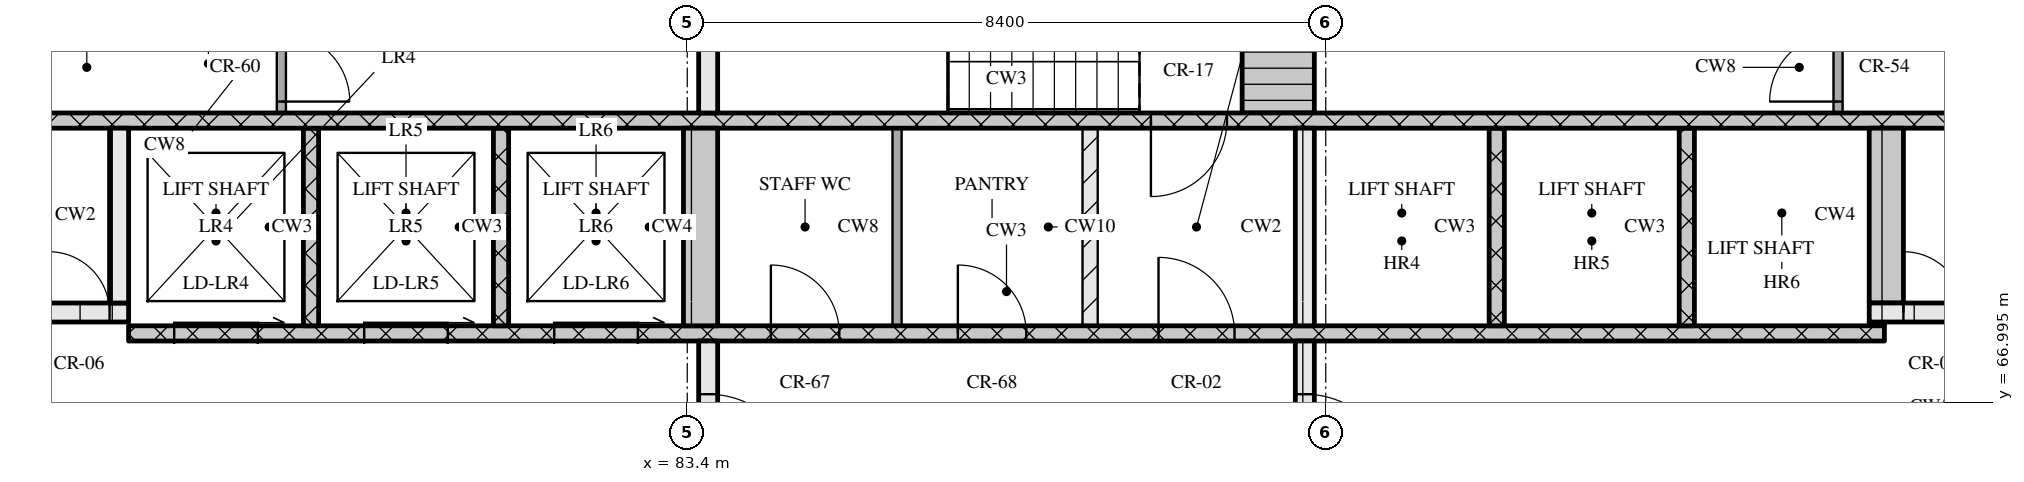
"""IFC4 building model, lengths in metres.
Left out: names, types, materials, properties, quantities, classifications, styles, units other than length and angle.
Written with IfcOpenShell. Run it as: python <this file> out.ifc"""

import sys

from ifc_helpers import new_model, si_unit, direction, frame, frame_2d, origin, place, context, subcontext, project, spatial, rectangle, extrude, element, fill, save


model = new_model("IFC4")
c1 = context("Model", 3, precision=1e-05, world=origin(), true_north=direction((0.0, 1.0)))
c2 = subcontext(c1, "Body", "Model", "MODEL_VIEW")
j1 = project(units=[si_unit("LENGTHUNIT", "METRE"), si_unit("PLANEANGLEUNIT", "RADIAN")], contexts=[c1])
p1 = place(None, origin())
s1 = spatial("IfcSite", under=j1, at=p1, CompositionType="ELEMENT")
p2 = place(p1, origin())
s2 = spatial("IfcBuilding", under=s1, at=p2, CompositionType="ELEMENT")
p3 = place(p2, frame((0.0, 0.0, 76.8)))
s3 = spatial("IfcBuildingStorey", under=s2, at=p3, CompositionType="ELEMENT", Elevation=76.8)
p4 = place(p3, frame((83.675, 65.2, 0.0), z_axis=(0.0, 0.0, 1.0), x_axis=(0.0, 1.0, 0.0)))
e1 = element("IfcWall", 1, at=p4, inside=s3, PredefinedType="SOLIDWALL", context=c2, shape_type="SweptSolid", body=[
    extrude(rectangle(XDim=2.6, YDim=0.25, at=frame_2d((1.3, 0.0))), origin(), (0.0, 0.0, 1.0), 3.32),
])
p5 = place(p4, frame((0.7, 0.0, 0.0)))
e2 = element("IfcOpeningElement", 2, at=p5, cuts=e1, PredefinedType="OPENING", context=c2, shape_type="SweptSolid", body=[
    extrude(rectangle(XDim=1.2, YDim=2.1, at=frame_2d((0.6, 1.05))), frame((0.0, 0.135, 0.0), z_axis=(0.0, -1.0, 0.0), x_axis=(1.0, 0.0, 0.0)), (0.0, 0.0, 1.0), 0.27),
])
p6 = place(p3, frame((91.525, 65.2, 0.0), z_axis=(0.0, 0.0, 1.0), x_axis=(0.0, 1.0, 0.0)))
e3 = element("IfcWall", 3, at=p6, inside=s3, PredefinedType="SOLIDWALL", context=c2, shape_type="SweptSolid", body=[
    extrude(rectangle(XDim=2.6, YDim=0.25, at=frame_2d((1.3, 0.0))), origin(), (0.0, 0.0, 1.0), 3.32),
])
p7 = place(p6, frame((0.7, 0.0, 0.0)))
e4 = element("IfcOpeningElement", 4, at=p7, cuts=e3, PredefinedType="OPENING", context=c2, shape_type="SweptSolid", body=[
    extrude(rectangle(XDim=1.2, YDim=2.1, at=frame_2d((0.6, 1.05))), frame((0.0, 0.135, 0.0), z_axis=(0.0, -1.0, 0.0), x_axis=(1.0, 0.0, 0.0)), (0.0, 0.0, 1.0), 0.27),
])
p8 = place(p3, frame((76.05, 67.9, 0.0), z_axis=(0.0, 0.0, 1.0), x_axis=(1.0, 0.0, 0.0)))
e5 = element("IfcWall", 5, at=p8, inside=s3, PredefinedType="SOLIDWALL", context=c2, shape_type="SweptSolid", body=[
    extrude(rectangle(XDim=23.1, YDim=0.2, at=frame_2d((11.55, 0.0))), origin(), (0.0, 0.0, 1.0), 3.32),
])
p9 = place(p8, frame((0.6, 0.0, 0.0)))
e6 = element("IfcOpeningElement", 6, at=p9, cuts=e5, PredefinedType="OPENING", context=c2, shape_type="SweptSolid", body=[
    extrude(rectangle(XDim=1.1, YDim=2.1, at=frame_2d((0.55, 1.05))), frame((0.0, 0.11, 0.0), z_axis=(0.0, -1.0, 0.0), x_axis=(1.0, 0.0, 0.0)), (0.0, 0.0, 1.0), 0.22),
])
p10 = place(p8, frame((3.1, 0.0, 0.0)))
e7 = element("IfcOpeningElement", 7, at=p10, cuts=e5, PredefinedType="OPENING", context=c2, shape_type="SweptSolid", body=[
    extrude(rectangle(XDim=1.1, YDim=2.1, at=frame_2d((0.55, 1.05))), frame((0.0, 0.11, 0.0), z_axis=(0.0, -1.0, 0.0), x_axis=(1.0, 0.0, 0.0)), (0.0, 0.0, 1.0), 0.22),
])
p11 = place(p8, frame((5.6, 0.0, 0.0)))
e8 = element("IfcOpeningElement", 8, at=p11, cuts=e5, PredefinedType="OPENING", context=c2, shape_type="SweptSolid", body=[
    extrude(rectangle(XDim=1.1, YDim=2.1, at=frame_2d((0.55, 1.05))), frame((0.0, 0.11, 0.0), z_axis=(0.0, -1.0, 0.0), x_axis=(1.0, 0.0, 0.0)), (0.0, 0.0, 1.0), 0.22),
])
p12 = place(p8, frame((8.45, 0.0, 0.0)))
e9 = element("IfcOpeningElement", 9, at=p12, cuts=e5, PredefinedType="OPENING", context=c2, shape_type="SweptSolid", body=[
    extrude(rectangle(XDim=0.9, YDim=2.1, at=frame_2d((0.45, 1.05))), frame((0.0, 0.11, 0.0), z_axis=(0.0, -1.0, 0.0), x_axis=(1.0, 0.0, 0.0)), (0.0, 0.0, 1.0), 0.22),
])
p13 = place(p8, frame((10.91, 0.0, 0.0)))
e10 = element("IfcOpeningElement", 10, at=p13, cuts=e5, PredefinedType="OPENING", context=c2, shape_type="SweptSolid", body=[
    extrude(rectangle(XDim=0.9, YDim=2.1, at=frame_2d((0.45, 1.05))), frame((0.0, 0.11, 0.0), z_axis=(0.0, -1.0, 0.0), x_axis=(1.0, 0.0, 0.0)), (0.0, 0.0, 1.0), 0.22),
])
p14 = place(p8, frame((13.55, 0.0, 0.0)))
e11 = element("IfcOpeningElement", 11, at=p14, cuts=e5, PredefinedType="OPENING", context=c2, shape_type="SweptSolid", body=[
    extrude(rectangle(XDim=1.0, YDim=2.1, at=frame_2d((0.5, 1.05))), frame((0.0, 0.11, 0.0), z_axis=(0.0, -1.0, 0.0), x_axis=(1.0, 0.0, 0.0)), (0.0, 0.0, 1.0), 0.22),
])
for number, where, z_axis, x_axis in (
    (12, (78.45, 68.0, 0.0), (0.0, 0.0, 1.0), (0.0, 1.0, 0.0)),
    (13, (80.95, 68.0, 0.0), (0.0, 0.0, 1.0), (0.0, 1.0, 0.0)),
):
    element("IfcWall", number, at=place(p3, frame(where, z_axis=z_axis, x_axis=x_axis)), inside=s3, PredefinedType="SOLIDWALL", context=c2, shape_type="SweptSolid", body=[
        extrude(rectangle(XDim=2.6, YDim=0.2, at=frame_2d((1.3, 0.0))), origin(), (0.0, 0.0, 1.0), 3.32),
    ])
p15 = place(p3, frame((83.575, 68.0, 0.0), z_axis=(0.0, 0.0, 1.0), x_axis=(0.0, 1.0, 0.0)))
e14 = element("IfcWall", 14, at=p15, inside=s3, PredefinedType="SOLIDWALL", context=c2, shape_type="SweptSolid", body=[
    extrude(rectangle(XDim=2.6, YDim=0.45, at=frame_2d((1.3, 0.0))), origin(), (0.0, 0.0, 1.0), 3.32),
])
p16 = place(p3, frame((86.16, 68.0, 0.0), z_axis=(0.0, 0.0, 1.0), x_axis=(0.0, 1.0, 0.0)))
e15 = element("IfcWall", 15, at=p16, inside=s3, PredefinedType="PARTITIONING", context=c2, shape_type="SweptSolid", body=[
    extrude(rectangle(XDim=2.6, YDim=0.12, at=frame_2d((1.3, 0.0))), origin(), (0.0, 0.0, 1.0), 3.32),
])
p17 = place(p3, frame((88.7, 68.0, 0.0), z_axis=(0.0, 0.0, 1.0), x_axis=(0.0, 1.0, 0.0)))
e16 = element("IfcWall", 16, at=p17, inside=s3, PredefinedType="PARTITIONING", context=c2, shape_type="SweptSolid", body=[
    extrude(rectangle(XDim=2.6, YDim=0.2, at=frame_2d((1.3, 0.0))), origin(), (0.0, 0.0, 1.0), 3.32),
])
p18 = place(p3, frame((91.525, 68.0, 0.0), z_axis=(0.0, 0.0, 1.0), x_axis=(0.0, 1.0, 0.0)))
e17 = element("IfcWall", 17, at=p18, inside=s3, PredefinedType="SOLIDWALL", context=c2, shape_type="SweptSolid", body=[
    extrude(rectangle(XDim=2.6, YDim=0.25, at=frame_2d((1.3, 0.0))), origin(), (0.0, 0.0, 1.0), 3.32),
])
for number, where, z_axis, x_axis in (
    (18, (94.05, 68.0, 0.0), (0.0, 0.0, 1.0), (0.0, 1.0, 0.0)),
    (19, (96.55, 68.0, 0.0), (0.0, 0.0, 1.0), (0.0, 1.0, 0.0)),
):
    element("IfcWall", number, at=place(p3, frame(where, z_axis=z_axis, x_axis=x_axis)), inside=s3, PredefinedType="SOLIDWALL", context=c2, shape_type="SweptSolid", body=[
        extrude(rectangle(XDim=2.6, YDim=0.2, at=frame_2d((1.3, 0.0))), origin(), (0.0, 0.0, 1.0), 3.32),
    ])
p19 = place(p3, frame((98.95, 68.025, 0.0), z_axis=(0.0, 0.0, 1.0), x_axis=(1.0, 0.0, 0.0)))
e20 = element("IfcWall", 20, at=p19, inside=s3, PredefinedType="SOLIDWALL", context=c2, shape_type="SweptSolid", body=[
    extrude(rectangle(XDim=0.2, YDim=0.05, at=frame_2d((0.1, 0.0))), origin(), (0.0, 0.0, 1.0), 3.32),
])
p20 = place(p3, frame((67.8, 68.175, 0.0), z_axis=(0.0, 0.0, 1.0), x_axis=(1.0, 0.0, 0.0)))
e21 = element("IfcWall", 21, at=p20, inside=s3, PredefinedType="SOLIDWALL", context=c2, shape_type="SweptSolid", body=[
    extrude(rectangle(XDim=8.25, YDim=0.25, at=frame_2d((4.125, 0.0))), origin(), (0.0, 0.0, 1.0), 3.32),
])
p21 = place(p20, frame((5.7, 0.0, 0.0)))
e22 = element("IfcOpeningElement", 22, at=p21, cuts=e21, PredefinedType="OPENING", context=c2, shape_type="SweptSolid", body=[
    extrude(rectangle(XDim=1.0, YDim=2.1, at=frame_2d((0.5, 1.05))), frame((0.0, 0.135, 0.0), z_axis=(0.0, -1.0, 0.0), x_axis=(1.0, 0.0, 0.0)), (0.0, 0.0, 1.0), 0.27),
])
p22 = place(p20, frame((7.2, 0.0, 0.0)))
e23 = element("IfcOpeningElement", 23, at=p22, cuts=e21, PredefinedType="OPENING", context=c2, shape_type="SweptSolid", body=[
    extrude(rectangle(XDim=0.8, YDim=2.1, at=frame_2d((0.4, 1.05))), frame((0.0, 0.135, 0.0), z_axis=(0.0, -1.0, 0.0), x_axis=(1.0, 0.0, 0.0)), (0.0, 0.0, 1.0), 0.27),
])
p23 = place(p3, frame((98.95, 68.175, 0.0), z_axis=(0.0, 0.0, 1.0), x_axis=(1.0, 0.0, 0.0)))
e24 = element("IfcWall", 24, at=p23, inside=s3, PredefinedType="SOLIDWALL", context=c2, shape_type="SweptSolid", body=[
    extrude(rectangle(XDim=8.45, YDim=0.25, at=frame_2d((4.225, 0.0))), origin(), (0.0, 0.0, 1.0), 3.32),
])
p24 = place(p23, frame((0.45, 0.0, 0.0)))
e25 = element("IfcOpeningElement", 25, at=p24, cuts=e24, PredefinedType="OPENING", context=c2, shape_type="SweptSolid", body=[
    extrude(rectangle(XDim=0.8, YDim=2.1, at=frame_2d((0.4, 1.05))), frame((0.0, 0.135, 0.0), z_axis=(0.0, -1.0, 0.0), x_axis=(1.0, 0.0, 0.0)), (0.0, 0.0, 1.0), 0.27),
])
p25 = place(p23, frame((1.75, 0.0, 0.0)))
e26 = element("IfcOpeningElement", 26, at=p25, cuts=e24, PredefinedType="OPENING", context=c2, shape_type="SweptSolid", body=[
    extrude(rectangle(XDim=1.0, YDim=2.1, at=frame_2d((0.5, 1.05))), frame((0.0, 0.135, 0.0), z_axis=(0.0, -1.0, 0.0), x_axis=(1.0, 0.0, 0.0)), (0.0, 0.0, 1.0), 0.27),
])
p26 = place(p3, frame((75.925, 68.3, 0.0), z_axis=(0.0, 0.0, 1.0), x_axis=(0.0, 1.0, 0.0)))
e27 = element("IfcWall", 27, at=p26, inside=s3, PredefinedType="SOLIDWALL", context=c2, shape_type="SweptSolid", body=[
    extrude(rectangle(XDim=2.3, YDim=0.25, at=frame_2d((1.15, 0.0))), origin(), (0.0, 0.0, 1.0), 3.32),
])
p27 = place(p3, frame((99.175, 68.3, 0.0), z_axis=(0.0, 0.0, 1.0), x_axis=(0.0, 1.0, 0.0)))
e28 = element("IfcWall", 28, at=p27, inside=s3, PredefinedType="SOLIDWALL", context=c2, shape_type="SweptSolid", body=[
    extrude(rectangle(XDim=2.3, YDim=0.45, at=frame_2d((1.15, 0.0))), origin(), (0.0, 0.0, 1.0), 3.32),
])
p28 = place(p3, frame((67.8, 70.7, 0.0), z_axis=(0.0, 0.0, 1.0), x_axis=(1.0, 0.0, 0.0)))
e29 = element("IfcWall", 29, at=p28, inside=s3, PredefinedType="SOLIDWALL", context=c2, shape_type="SweptSolid", body=[
    extrude(rectangle(XDim=39.6, YDim=0.2, at=frame_2d((19.8, 0.0))), origin(), (0.0, 0.0, 1.0), 3.32),
])
p29 = place(p28, frame((0.65, 0.0, 0.0)))
e30 = element("IfcOpeningElement", 30, at=p29, cuts=e29, PredefinedType="OPENING", context=c2, shape_type="SweptSolid", body=[
    extrude(rectangle(XDim=1.1, YDim=2.1, at=frame_2d((0.55, 1.05))), frame((0.0, 0.11, 0.0), z_axis=(0.0, -1.0, 0.0), x_axis=(1.0, 0.0, 0.0)), (0.0, 0.0, 1.0), 0.22),
])
p30 = place(p28, frame((3.25, 0.0, 0.0)))
e31 = element("IfcOpeningElement", 31, at=p30, cuts=e29, PredefinedType="OPENING", context=c2, shape_type="SweptSolid", body=[
    extrude(rectangle(XDim=1.1, YDim=2.1, at=frame_2d((0.55, 1.05))), frame((0.0, 0.11, 0.0), z_axis=(0.0, -1.0, 0.0), x_axis=(1.0, 0.0, 0.0)), (0.0, 0.0, 1.0), 0.22),
])
p31 = place(p28, frame((5.9, 0.0, 0.0)))
e32 = element("IfcOpeningElement", 32, at=p31, cuts=e29, PredefinedType="OPENING", context=c2, shape_type="SweptSolid", body=[
    extrude(rectangle(XDim=1.0, YDim=2.1, at=frame_2d((0.5, 1.05))), frame((0.0, 0.11, 0.0), z_axis=(0.0, -1.0, 0.0), x_axis=(1.0, 0.0, 0.0)), (0.0, 0.0, 1.0), 0.22),
])
p32 = place(p28, frame((21.7, 0.0, 0.0)))
e33 = element("IfcOpeningElement", 33, at=p32, cuts=e29, PredefinedType="OPENING", context=c2, shape_type="SweptSolid", body=[
    extrude(rectangle(XDim=1.0, YDim=2.1, at=frame_2d((0.5, 1.05))), frame((0.0, 0.11, 0.0), z_axis=(0.0, -1.0, 0.0), x_axis=(1.0, 0.0, 0.0)), (0.0, 0.0, 1.0), 0.22),
])
p33 = place(p28, frame((32.7, 0.0, 0.0)))
e34 = element("IfcOpeningElement", 34, at=p33, cuts=e29, PredefinedType="OPENING", context=c2, shape_type="SweptSolid", body=[
    extrude(rectangle(XDim=1.0, YDim=2.1, at=frame_2d((0.5, 1.05))), frame((0.0, 0.11, 0.0), z_axis=(0.0, -1.0, 0.0), x_axis=(1.0, 0.0, 0.0)), (0.0, 0.0, 1.0), 0.22),
])
p34 = place(p28, frame((35.25, 0.0, 0.0)))
e35 = element("IfcOpeningElement", 35, at=p34, cuts=e29, PredefinedType="OPENING", context=c2, shape_type="SweptSolid", body=[
    extrude(rectangle(XDim=1.1, YDim=2.1, at=frame_2d((0.55, 1.05))), frame((0.0, 0.11, 0.0), z_axis=(0.0, -1.0, 0.0), x_axis=(1.0, 0.0, 0.0)), (0.0, 0.0, 1.0), 0.22),
])
p35 = place(p28, frame((37.85, 0.0, 0.0)))
e36 = element("IfcOpeningElement", 36, at=p35, cuts=e29, PredefinedType="OPENING", context=c2, shape_type="SweptSolid", body=[
    extrude(rectangle(XDim=1.1, YDim=2.1, at=frame_2d((0.55, 1.05))), frame((0.0, 0.11, 0.0), z_axis=(0.0, -1.0, 0.0), x_axis=(1.0, 0.0, 0.0)), (0.0, 0.0, 1.0), 0.22),
])
p36 = place(p3, frame((78.06, 70.8, 0.0), z_axis=(0.0, 0.0, 1.0), x_axis=(0.0, 1.0, 0.0)))
e37 = element("IfcWall", 37, at=p36, inside=s3, PredefinedType="PARTITIONING", context=c2, shape_type="SweptSolid", body=[
    extrude(rectangle(XDim=1.2, YDim=0.12, at=frame_2d((0.6, 0.0))), origin(), (0.0, 0.0, 1.0), 3.32),
])
p37 = place(p36, frame((0.15, 0.0, 0.0)))
e38 = element("IfcOpeningElement", 38, at=p37, cuts=e37, PredefinedType="OPENING", context=c2, shape_type="SweptSolid", body=[
    extrude(rectangle(XDim=0.9, YDim=2.1, at=frame_2d((0.45, 1.05))), frame((0.0, 0.07, 0.0), z_axis=(0.0, -1.0, 0.0), x_axis=(1.0, 0.0, 0.0)), (0.0, 0.0, 1.0), 0.14),
])
p38 = place(p3, frame((83.675, 70.8, 0.0), z_axis=(0.0, 0.0, 1.0), x_axis=(0.0, 1.0, 0.0)))
e39 = element("IfcWall", 39, at=p38, inside=s3, PredefinedType="SOLIDWALL", context=c2, shape_type="SweptSolid", body=[
    extrude(rectangle(XDim=2.95, YDim=0.25, at=frame_2d((1.475, 0.0))), origin(), (0.0, 0.0, 1.0), 3.32),
])
p39 = place(p3, frame((91.175, 70.8, 0.0), z_axis=(0.0, 0.0, 1.0), x_axis=(0.0, 1.0, 0.0)))
e40 = element("IfcWall", 40, at=p39, inside=s3, PredefinedType="SOLIDWALL", context=c2, shape_type="SweptSolid", body=[
    extrude(rectangle(XDim=2.95, YDim=0.95, at=frame_2d((1.475, 0.0))), origin(), (0.0, 0.0, 1.0), 3.32),
])
p40 = place(p3, frame((98.54, 70.8, 0.0), z_axis=(0.0, 0.0, 1.0), x_axis=(0.0, 1.0, 0.0)))
e41 = element("IfcWall", 41, at=p40, inside=s3, PredefinedType="PARTITIONING", context=c2, shape_type="SweptSolid", body=[
    extrude(rectangle(XDim=1.2, YDim=0.12, at=frame_2d((0.6, 0.0))), origin(), (0.0, 0.0, 1.0), 3.32),
])
p41 = place(p40, frame((0.15, 0.0, 0.0)))
e42 = element("IfcOpeningElement", 42, at=p41, cuts=e41, PredefinedType="OPENING", context=c2, shape_type="SweptSolid", body=[
    extrude(rectangle(XDim=0.9, YDim=2.1, at=frame_2d((0.45, 1.05))), frame((0.0, 0.07, 0.0), z_axis=(0.0, -1.0, 0.0), x_axis=(1.0, 0.0, 0.0)), (0.0, 0.0, 1.0), 0.14),
])
p42 = place(p5, origin())
e43 = element("IfcDoor", 43, at=p42, inside=s3, OperationType="SINGLE_SWING_RIGHT", PredefinedType="DOOR", context=c2, shape_type="SweptSolid", body=[
    extrude(rectangle(XDim=1.2, YDim=2.1, at=frame_2d((0.6, 1.05))), frame((0.0, 0.025, 0.0), z_axis=(0.0, -1.0, 0.0), x_axis=(1.0, 0.0, 0.0)), (0.0, 0.0, 1.0), 0.05),
])
fill(e2, e43)
p43 = place(p7, origin())
e44 = element("IfcDoor", 44, at=p43, inside=s3, OperationType="SINGLE_SWING_RIGHT", PredefinedType="DOOR", context=c2, shape_type="SweptSolid", body=[
    extrude(rectangle(XDim=1.2, YDim=2.1, at=frame_2d((0.6, 1.05))), frame((0.0, 0.025, 0.0), z_axis=(0.0, -1.0, 0.0), x_axis=(1.0, 0.0, 0.0)), (0.0, 0.0, 1.0), 0.05),
])
fill(e4, e44)
p44 = place(p9, origin())
e45 = element("IfcDoor", 45, at=p44, inside=s3, OperationType="SLIDING_TO_RIGHT", PredefinedType="DOOR", context=c2, shape_type="SweptSolid", body=[
    extrude(rectangle(XDim=1.1, YDim=2.1, at=frame_2d((0.55, 1.05))), frame((0.0, 0.025, 0.0), z_axis=(0.0, -1.0, 0.0), x_axis=(1.0, 0.0, 0.0)), (0.0, 0.0, 1.0), 0.05),
])
fill(e6, e45)
p45 = place(p10, origin())
e46 = element("IfcDoor", 46, at=p45, inside=s3, OperationType="SLIDING_TO_RIGHT", PredefinedType="DOOR", context=c2, shape_type="SweptSolid", body=[
    extrude(rectangle(XDim=1.1, YDim=2.1, at=frame_2d((0.55, 1.05))), frame((0.0, 0.025, 0.0), z_axis=(0.0, -1.0, 0.0), x_axis=(1.0, 0.0, 0.0)), (0.0, 0.0, 1.0), 0.05),
])
fill(e7, e46)
p46 = place(p11, origin())
e47 = element("IfcDoor", 47, at=p46, inside=s3, OperationType="SLIDING_TO_RIGHT", PredefinedType="DOOR", context=c2, shape_type="SweptSolid", body=[
    extrude(rectangle(XDim=1.1, YDim=2.1, at=frame_2d((0.55, 1.05))), frame((0.0, 0.025, 0.0), z_axis=(0.0, -1.0, 0.0), x_axis=(1.0, 0.0, 0.0)), (0.0, 0.0, 1.0), 0.05),
])
fill(e8, e47)
p47 = place(p12, origin())
e48 = element("IfcDoor", 48, at=p47, inside=s3, OperationType="SINGLE_SWING_LEFT", PredefinedType="DOOR", context=c2, shape_type="SweptSolid", body=[
    extrude(rectangle(XDim=0.9, YDim=2.1, at=frame_2d((0.45, 1.05))), frame((0.0, 0.025, 0.0), z_axis=(0.0, -1.0, 0.0), x_axis=(1.0, 0.0, 0.0)), (0.0, 0.0, 1.0), 0.05),
])
fill(e9, e48)
p48 = place(p13, origin())
e49 = element("IfcDoor", 49, at=p48, inside=s3, OperationType="SINGLE_SWING_LEFT", PredefinedType="DOOR", context=c2, shape_type="SweptSolid", body=[
    extrude(rectangle(XDim=0.9, YDim=2.1, at=frame_2d((0.45, 1.05))), frame((0.0, 0.025, 0.0), z_axis=(0.0, -1.0, 0.0), x_axis=(1.0, 0.0, 0.0)), (0.0, 0.0, 1.0), 0.05),
])
fill(e10, e49)
p49 = place(p14, origin())
e50 = element("IfcDoor", 50, at=p49, inside=s3, OperationType="SINGLE_SWING_LEFT", PredefinedType="DOOR", context=c2, shape_type="SweptSolid", body=[
    extrude(rectangle(XDim=1.0, YDim=2.1, at=frame_2d((0.5, 1.05))), frame((0.0, 0.025, 0.0), z_axis=(0.0, -1.0, 0.0), x_axis=(1.0, 0.0, 0.0)), (0.0, 0.0, 1.0), 0.05),
])
fill(e11, e50)
p50 = place(p22, origin())
e51 = element("IfcDoor", 51, at=p50, inside=s3, OperationType="SINGLE_SWING_LEFT", PredefinedType="DOOR", context=c2, shape_type="SweptSolid", body=[
    extrude(rectangle(XDim=0.8, YDim=2.1, at=frame_2d((0.4, 1.05))), frame((0.0, 0.025, 0.0), z_axis=(0.0, -1.0, 0.0), x_axis=(1.0, 0.0, 0.0)), (0.0, 0.0, 1.0), 0.05),
])
fill(e23, e51)
p51 = place(p24, origin())
e52 = element("IfcDoor", 52, at=p51, inside=s3, OperationType="SINGLE_SWING_LEFT", PredefinedType="DOOR", context=c2, shape_type="SweptSolid", body=[
    extrude(rectangle(XDim=0.8, YDim=2.1, at=frame_2d((0.4, 1.05))), frame((0.0, 0.025, 0.0), z_axis=(0.0, -1.0, 0.0), x_axis=(1.0, 0.0, 0.0)), (0.0, 0.0, 1.0), 0.05),
])
fill(e25, e52)
p52 = place(p32, origin())
e53 = element("IfcDoor", 53, at=p52, inside=s3, OperationType="SINGLE_SWING_RIGHT", PredefinedType="DOOR", context=c2, shape_type="SweptSolid", body=[
    extrude(rectangle(XDim=1.0, YDim=2.1, at=frame_2d((0.5, 1.05))), frame((0.0, 0.025, 0.0), z_axis=(0.0, -1.0, 0.0), x_axis=(1.0, 0.0, 0.0)), (0.0, 0.0, 1.0), 0.05),
])
fill(e33, e53)
p53 = place(p37, origin())
e54 = element("IfcDoor", 54, at=p53, inside=s3, OperationType="SINGLE_SWING_RIGHT", PredefinedType="DOOR", context=c2, shape_type="SweptSolid", body=[
    extrude(rectangle(XDim=0.9, YDim=2.1, at=frame_2d((0.45, 1.05))), frame((0.0, 0.025, 0.0), z_axis=(0.0, -1.0, 0.0), x_axis=(1.0, 0.0, 0.0)), (0.0, 0.0, 1.0), 0.05),
])
fill(e38, e54)
p54 = place(p41, origin())
e55 = element("IfcDoor", 55, at=p54, inside=s3, OperationType="SINGLE_SWING_LEFT", PredefinedType="DOOR", context=c2, shape_type="SweptSolid", body=[
    extrude(rectangle(XDim=0.9, YDim=2.1, at=frame_2d((0.45, 1.05))), frame((0.0, 0.025, 0.0), z_axis=(0.0, -1.0, 0.0), x_axis=(1.0, 0.0, 0.0)), (0.0, 0.0, 1.0), 0.05),
])
fill(e42, e55)
save(model, sys.argv[1])
